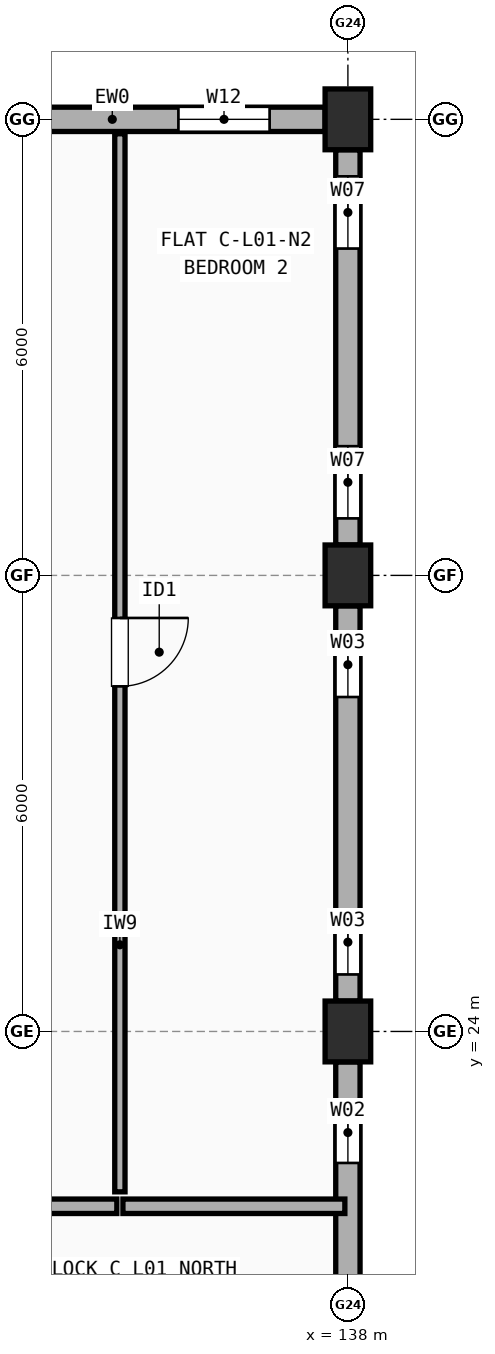
"""IFC4 building model, lengths in metres.
Left out: names, types, materials, properties, quantities, classifications, styles, units other than length and angle.
Written with IfcOpenShell. Run it as: python <this file> out.ifc"""

import sys

from ifc_helpers import new_model, si_unit, direction, frame, frame_2d, origin, origin_2d, place, context, subcontext, project, spatial, rectangle, extrude, element, fill, save


model = new_model("IFC4")
c1 = context("Model", 3, precision=1e-05, world=origin(), true_north=direction((0.0, 1.0)))
c2 = subcontext(c1, "Body", "Model", "MODEL_VIEW")
j1 = project(units=[si_unit("LENGTHUNIT", "METRE"), si_unit("PLANEANGLEUNIT", "RADIAN")], contexts=[c1])
p1 = place(None, origin())
s1 = spatial("IfcSite", under=j1, at=p1, CompositionType="ELEMENT")
p2 = place(p1, origin())
s2 = spatial("IfcBuilding", under=s1, at=p2, CompositionType="ELEMENT")
p3 = place(p2, frame((0.0, 0.0, 4.5)))
s3 = spatial("IfcBuildingStorey", under=s2, at=p3, CompositionType="ELEMENT", Elevation=4.5)
for number, where, z_axis, x_axis in (
    (1, (138.0, 24.0, 0.0), (0.0, 0.0, 1.0), (1.0, 0.0, 0.0)),
    (2, (138.0, 30.0, 0.0), (0.0, 0.0, 1.0), (1.0, 0.0, 0.0)),
    (3, (138.0, 36.0, 0.0), (0.0, 0.0, 1.0), (1.0, 0.0, 0.0)),
):
    element("IfcColumn", number, at=place(p3, frame(where, z_axis=z_axis, x_axis=x_axis)), inside=s3, PredefinedType="COLUMN", context=c2, shape_type="SweptSolid", body=[
        extrude(rectangle(XDim=0.6, YDim=0.8, at=origin_2d()), origin(), (0.0, 0.0, 1.0), 2.945),
    ])
p4 = place(p3, frame((138.0, 18.4, 0.0), z_axis=(0.0, 0.0, 1.0), x_axis=(0.0, 1.0, 0.0)))
e4 = element("IfcWall", 4, at=p4, inside=s3, PredefinedType="STANDARD", context=c2, shape_type="SweptSolid", body=[
    extrude(rectangle(XDim=5.2, YDim=0.32, at=frame_2d((2.6, 0.0))), origin(), (0.0, 0.0, 1.0), 2.427),
])
p5 = place(p4, frame((1.03, 0.0, 0.9)))
e5 = element("IfcOpeningElement", 5, at=p5, cuts=e4, PredefinedType="OPENING", context=c2, shape_type="SweptSolid", body=[
    extrude(rectangle(XDim=1.2, YDim=1.35, at=frame_2d((0.6, 0.675))), frame((0.0, 0.17, 0.0), z_axis=(0.0, -1.0, 0.0), x_axis=(1.0, 0.0, 0.0)), (0.0, 0.0, 1.0), 0.34),
])
p6 = place(p4, frame((3.87, 0.0, 0.9)))
e6 = element("IfcOpeningElement", 6, at=p6, cuts=e4, PredefinedType="OPENING", context=c2, shape_type="SweptSolid", body=[
    extrude(rectangle(XDim=0.8, YDim=1.2, at=frame_2d((0.4, 0.6))), frame((0.0, 0.17, 0.0), z_axis=(0.0, -1.0, 0.0), x_axis=(1.0, 0.0, 0.0)), (0.0, 0.0, 1.0), 0.34),
])
p7 = place(p3, frame((138.0, 24.4, 0.0), z_axis=(0.0, 0.0, 1.0), x_axis=(0.0, 1.0, 0.0)))
e7 = element("IfcWall", 7, at=p7, inside=s3, PredefinedType="STANDARD", context=c2, shape_type="SweptSolid", body=[
    extrude(rectangle(XDim=5.2, YDim=0.32, at=frame_2d((2.6, 0.0))), origin(), (0.0, 0.0, 1.0), 2.427),
])
p8 = place(p7, frame((0.35, 0.0, 0.9)))
e8 = element("IfcOpeningElement", 8, at=p8, cuts=e7, PredefinedType="OPENING", context=c2, shape_type="SweptSolid", body=[
    extrude(rectangle(XDim=0.85, YDim=1.25, at=frame_2d((0.425, 0.625))), frame((0.0, 0.17, 0.0), z_axis=(0.0, -1.0, 0.0), x_axis=(1.0, 0.0, 0.0)), (0.0, 0.0, 1.0), 0.34),
])
p9 = place(p7, frame((4.0, 0.0, 0.9)))
e9 = element("IfcOpeningElement", 9, at=p9, cuts=e7, PredefinedType="OPENING", context=c2, shape_type="SweptSolid", body=[
    extrude(rectangle(XDim=0.85, YDim=1.25, at=frame_2d((0.425, 0.625))), frame((0.0, 0.17, 0.0), z_axis=(0.0, -1.0, 0.0), x_axis=(1.0, 0.0, 0.0)), (0.0, 0.0, 1.0), 0.34),
])
p10 = place(p3, frame((138.0, 30.4, 0.0), z_axis=(0.0, 0.0, 1.0), x_axis=(0.0, 1.0, 0.0)))
e10 = element("IfcWall", 10, at=p10, inside=s3, PredefinedType="STANDARD", context=c2, shape_type="SweptSolid", body=[
    extrude(rectangle(XDim=5.2, YDim=0.32, at=frame_2d((2.6, 0.0))), origin(), (0.0, 0.0, 1.0), 2.427),
])
p11 = place(p10, frame((0.35, 0.0, 0.9)))
e11 = element("IfcOpeningElement", 11, at=p11, cuts=e10, PredefinedType="OPENING", context=c2, shape_type="SweptSolid", body=[
    extrude(rectangle(XDim=0.95, YDim=1.35, at=frame_2d((0.475, 0.675))), frame((0.0, 0.17, 0.0), z_axis=(0.0, -1.0, 0.0), x_axis=(1.0, 0.0, 0.0)), (0.0, 0.0, 1.0), 0.34),
])
p12 = place(p10, frame((3.9, 0.0, 0.9)))
e12 = element("IfcOpeningElement", 12, at=p12, cuts=e10, PredefinedType="OPENING", context=c2, shape_type="SweptSolid", body=[
    extrude(rectangle(XDim=0.95, YDim=1.35, at=frame_2d((0.475, 0.675))), frame((0.0, 0.17, 0.0), z_axis=(0.0, -1.0, 0.0), x_axis=(1.0, 0.0, 0.0)), (0.0, 0.0, 1.0), 0.34),
])
p13 = place(p3, frame((137.7, 36.0, 0.0), z_axis=(0.0, 0.0, 1.0), x_axis=(-1.0, 0.0, 0.0)))
e13 = element("IfcWall", 13, at=p13, inside=s3, PredefinedType="STANDARD", context=c2, shape_type="SweptSolid", body=[
    extrude(rectangle(XDim=5.4, YDim=0.32, at=frame_2d((2.7, 0.0))), origin(), (0.0, 0.0, 1.0), 2.427),
])
p14 = place(p13, frame((0.73, 0.0, 0.9)))
e14 = element("IfcOpeningElement", 14, at=p14, cuts=e13, PredefinedType="OPENING", context=c2, shape_type="SweptSolid", body=[
    extrude(rectangle(XDim=1.2, YDim=1.35, at=frame_2d((0.6, 0.675))), frame((0.0, 0.17, 0.0), z_axis=(0.0, -1.0, 0.0), x_axis=(1.0, 0.0, 0.0)), (0.0, 0.0, 1.0), 0.34),
])
p15 = place(p13, frame((3.67, 0.0, 0.9)))
e15 = element("IfcOpeningElement", 15, at=p15, cuts=e13, PredefinedType="OPENING", context=c2, shape_type="SweptSolid", body=[
    extrude(rectangle(XDim=0.8, YDim=1.2, at=frame_2d((0.4, 0.6))), frame((0.0, 0.17, 0.0), z_axis=(0.0, -1.0, 0.0), x_axis=(1.0, 0.0, 0.0)), (0.0, 0.0, 1.0), 0.34),
])
p16 = place(p3, frame((124.54, 21.7, 0.0), z_axis=(0.0, 0.0, 1.0), x_axis=(1.0, 0.0, 0.0)))
e16 = element("IfcWall", 16, at=p16, inside=s3, PredefinedType="SOLIDWALL", context=c2, shape_type="SweptSolid", body=[
    extrude(rectangle(XDim=10.42, YDim=0.19, at=frame_2d((5.21, 0.0))), origin(), (0.0, 0.0, 1.0), 2.427),
])
p17 = place(p16, frame((4.685, 0.0, 0.0)))
e17 = element("IfcOpeningElement", 17, at=p17, cuts=e16, PredefinedType="OPENING", context=c2, shape_type="SweptSolid", body=[
    extrude(rectangle(XDim=1.05, YDim=2.15, at=frame_2d((0.525, 1.075))), frame((0.0, 0.105, 0.0), z_axis=(0.0, -1.0, 0.0), x_axis=(1.0, 0.0, 0.0)), (0.0, 0.0, 1.0), 0.21),
])
p18 = place(p3, frame((135.04, 21.7, 0.0), z_axis=(0.0, 0.0, 1.0), x_axis=(1.0, 0.0, 0.0)))
e18 = element("IfcWall", 18, at=p18, inside=s3, PredefinedType="SOLIDWALL", context=c2, shape_type="SweptSolid", body=[
    extrude(rectangle(XDim=2.92, YDim=0.19, at=frame_2d((1.46, 0.0))), origin(), (0.0, 0.0, 1.0), 2.427),
])
p19 = place(p3, frame((135.0, 21.89, 0.0), z_axis=(0.0, 0.0, 1.0), x_axis=(0.0, 1.0, 0.0)))
e19 = element("IfcWall", 19, at=p19, inside=s3, PredefinedType="PARTITIONING", context=c2, shape_type="SweptSolid", body=[
    extrude(rectangle(XDim=13.92, YDim=0.135, at=frame_2d((6.96, 0.0))), origin(), (0.0, 0.0, 1.0), 2.377),
])
p20 = place(p19, frame((6.65, 0.0, 0.0)))
e20 = element("IfcOpeningElement", 20, at=p20, cuts=e19, PredefinedType="OPENING", context=c2, shape_type="SweptSolid", body=[
    extrude(rectangle(XDim=0.9, YDim=2.1, at=frame_2d((0.45, 1.05))), frame((0.0, 0.077, 0.0), z_axis=(0.0, -1.0, 0.0), x_axis=(1.0, 0.0, 0.0)), (0.0, 0.0, 1.0), 0.155),
])
p21 = place(p6, origin())
e21 = element("IfcWindow", 21, at=p21, inside=s3, PartitioningType="SINGLE_PANEL", PredefinedType="WINDOW", context=c2, shape_type="SweptSolid", body=[
    extrude(rectangle(XDim=0.8, YDim=1.2, at=frame_2d((0.4, 0.6))), frame((0.0, 0.03, 0.0), z_axis=(0.0, -1.0, 0.0), x_axis=(1.0, 0.0, 0.0)), (0.0, 0.0, 1.0), 0.06),
])
fill(e6, e21)
p22 = place(p8, origin())
e22 = element("IfcWindow", 22, at=p22, inside=s3, PartitioningType="SINGLE_PANEL", PredefinedType="WINDOW", context=c2, shape_type="SweptSolid", body=[
    extrude(rectangle(XDim=0.85, YDim=1.25, at=frame_2d((0.425, 0.625))), frame((0.0, 0.03, 0.0), z_axis=(0.0, -1.0, 0.0), x_axis=(1.0, 0.0, 0.0)), (0.0, 0.0, 1.0), 0.06),
])
fill(e8, e22)
p23 = place(p9, origin())
e23 = element("IfcWindow", 23, at=p23, inside=s3, PartitioningType="SINGLE_PANEL", PredefinedType="WINDOW", context=c2, shape_type="SweptSolid", body=[
    extrude(rectangle(XDim=0.85, YDim=1.25, at=frame_2d((0.425, 0.625))), frame((0.0, 0.03, 0.0), z_axis=(0.0, -1.0, 0.0), x_axis=(1.0, 0.0, 0.0)), (0.0, 0.0, 1.0), 0.06),
])
fill(e9, e23)
p24 = place(p11, origin())
e24 = element("IfcWindow", 24, at=p24, inside=s3, PartitioningType="SINGLE_PANEL", PredefinedType="WINDOW", context=c2, shape_type="SweptSolid", body=[
    extrude(rectangle(XDim=0.95, YDim=1.35, at=frame_2d((0.475, 0.675))), frame((0.0, 0.03, 0.0), z_axis=(0.0, -1.0, 0.0), x_axis=(1.0, 0.0, 0.0)), (0.0, 0.0, 1.0), 0.06),
])
fill(e11, e24)
p25 = place(p12, origin())
e25 = element("IfcWindow", 25, at=p25, inside=s3, PartitioningType="SINGLE_PANEL", PredefinedType="WINDOW", context=c2, shape_type="SweptSolid", body=[
    extrude(rectangle(XDim=0.95, YDim=1.35, at=frame_2d((0.475, 0.675))), frame((0.0, 0.03, 0.0), z_axis=(0.0, -1.0, 0.0), x_axis=(1.0, 0.0, 0.0)), (0.0, 0.0, 1.0), 0.06),
])
fill(e12, e25)
p26 = place(p14, origin())
e26 = element("IfcWindow", 26, at=p26, inside=s3, PartitioningType="SINGLE_PANEL", PredefinedType="WINDOW", context=c2, shape_type="SweptSolid", body=[
    extrude(rectangle(XDim=1.2, YDim=1.35, at=frame_2d((0.6, 0.675))), frame((0.0, 0.03, 0.0), z_axis=(0.0, -1.0, 0.0), x_axis=(1.0, 0.0, 0.0)), (0.0, 0.0, 1.0), 0.06),
])
fill(e14, e26)
p27 = place(p20, origin())
e27 = element("IfcDoor", 27, at=p27, inside=s3, OperationType="SINGLE_SWING_RIGHT", PredefinedType="DOOR", context=c2, shape_type="SweptSolid", body=[
    extrude(rectangle(XDim=0.9, YDim=2.1, at=frame_2d((0.45, 1.05))), frame((0.0, 0.025, 0.0), z_axis=(0.0, -1.0, 0.0), x_axis=(1.0, 0.0, 0.0)), (0.0, 0.0, 1.0), 0.05),
])
fill(e20, e27)
save(model, sys.argv[1])
